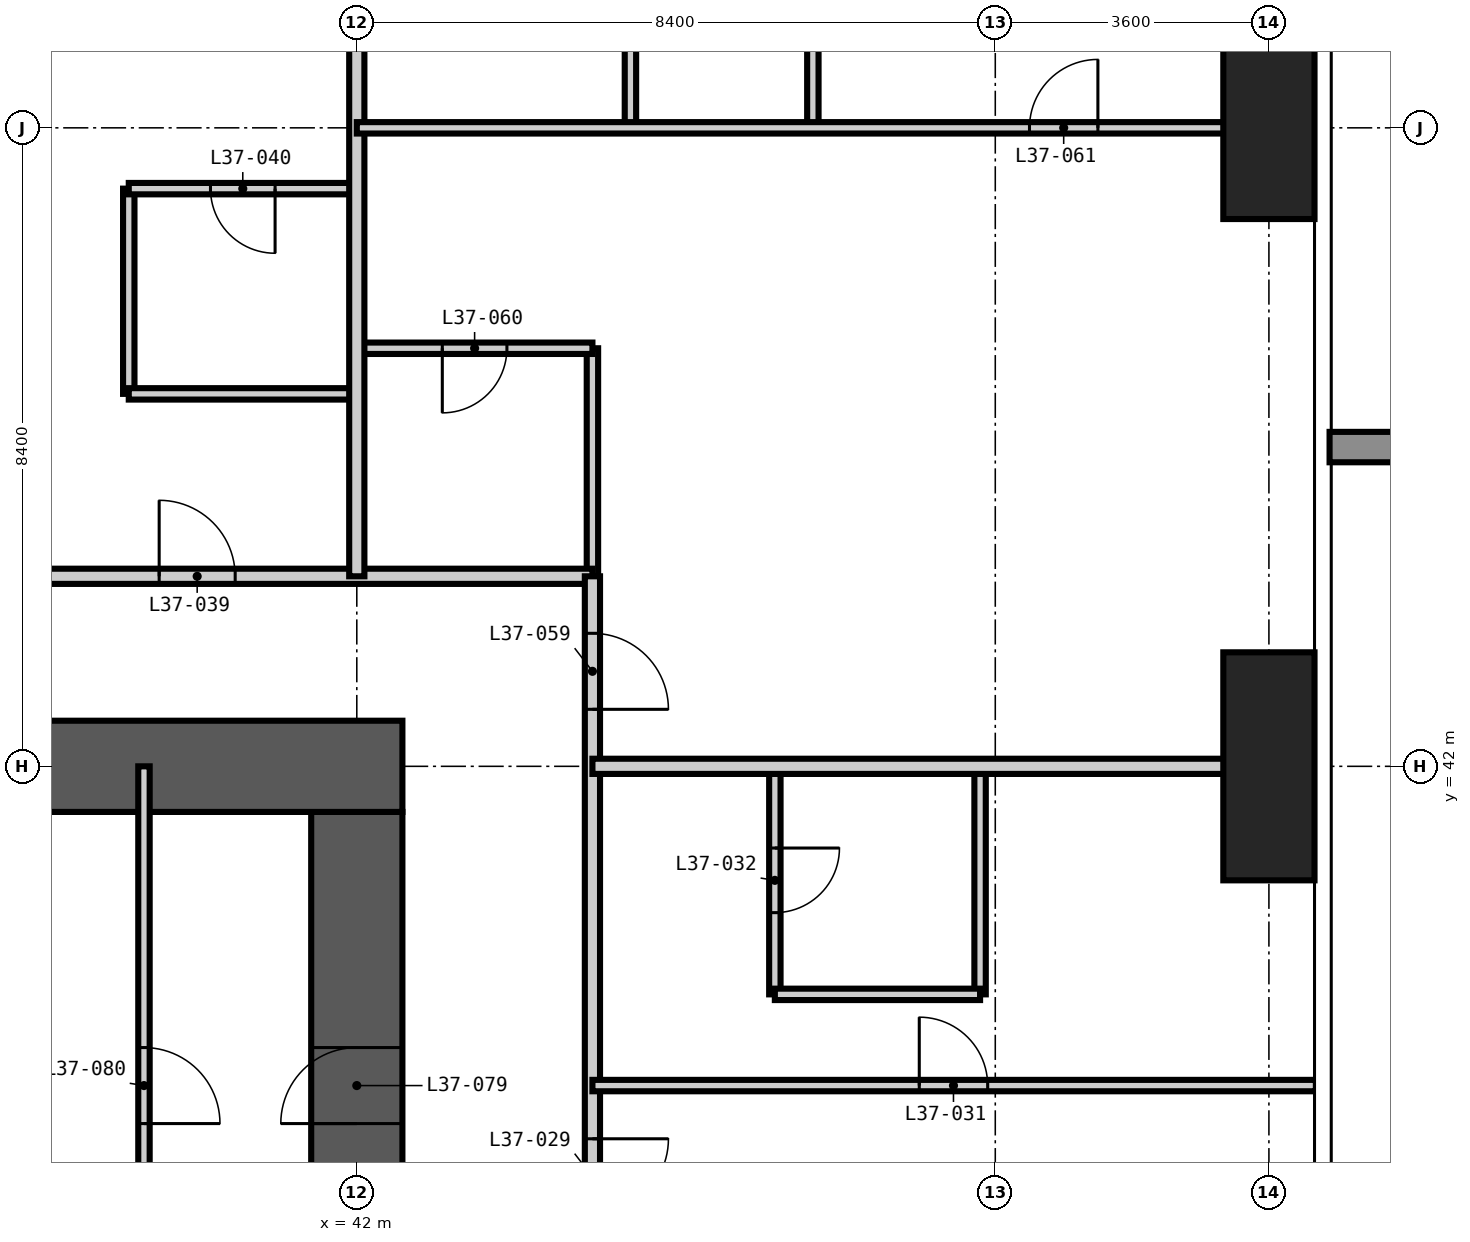
"""IFC4 building model, lengths in metres.
Left out: names, types, materials, properties, quantities, classifications, styles, units other than length and angle.
Written with IfcOpenShell. Run it as: python <this file> out.ifc"""

import sys

from ifc_helpers import new_model, si_unit, direction, frame, frame_2d, origin, origin_2d, place, context, subcontext, project, spatial, rectangle, extrude, element, fill, save


model = new_model("IFC4")
c1 = context("Model", 3, precision=1e-05, world=origin(), true_north=direction((0.0, 1.0)))
c2 = subcontext(c1, "Body", "Model", "MODEL_VIEW")
j1 = project(units=[si_unit("LENGTHUNIT", "METRE"), si_unit("PLANEANGLEUNIT", "RADIAN")], contexts=[c1])
p1 = place(None, origin())
s1 = spatial("IfcSite", under=j1, at=p1, CompositionType="ELEMENT")
p2 = place(p1, origin())
s2 = spatial("IfcBuilding", under=s1, at=p2, CompositionType="ELEMENT")
p3 = place(p2, frame((0.0, 0.0, 144.0)))
s3 = spatial("IfcBuildingStorey", under=s2, at=p3, CompositionType="ELEMENT", Elevation=144.0)
p4 = place(p3, frame((54.0, 42.0, -0.35), z_axis=(0.0, 0.0, 1.0), x_axis=(1.0, 0.0, 0.0)))
e1 = element("IfcColumn", 1, at=p4, inside=s3, PredefinedType="COLUMN", context=c2, shape_type="SweptSolid", body=[
    extrude(rectangle(XDim=1.2, YDim=3.0, at=origin_2d()), origin(), (0.0, 0.0, 1.0), 3.6),
])
p5 = place(p3, frame((54.0, 50.4, -0.35), z_axis=(0.0, 0.0, 1.0), x_axis=(1.0, 0.0, 0.0)))
e2 = element("IfcColumn", 2, at=p5, inside=s3, PredefinedType="COLUMN", context=c2, shape_type="SweptSolid", body=[
    extrude(rectangle(XDim=1.2, YDim=2.4, at=origin_2d()), origin(), (0.0, 0.0, 1.0), 3.6),
])
p6 = place(p3, frame((42.0, 17.4, -0.35), z_axis=(0.0, 0.0, 1.0), x_axis=(0.0, 1.0, 0.0)))
e3 = element("IfcWall", 3, at=p6, inside=s3, PredefinedType="SHEAR", context=c2, shape_type="SweptSolid", body=[
    extrude(rectangle(XDim=24.0, YDim=1.2, at=frame_2d((12.0, 0.0))), origin(), (0.0, 0.0, 1.0), 3.6),
])
p7 = place(p6, frame((0.2, 0.0, 0.35)))
e4 = element("IfcOpeningElement", 4, at=p7, cuts=e3, PredefinedType="OPENING", context=c2, shape_type="SweptSolid", body=[
    extrude(rectangle(XDim=1.2, YDim=2.2, at=frame_2d((0.6, 1.1))), frame((0.0, 0.61, 0.0), z_axis=(0.0, -1.0, 0.0), x_axis=(1.0, 0.0, 0.0)), (0.0, 0.0, 1.0), 1.22),
])
p8 = place(p6, frame((11.1, 0.0, 0.35)))
e5 = element("IfcOpeningElement", 5, at=p8, cuts=e3, PredefinedType="OPENING", context=c2, shape_type="SweptSolid", body=[
    extrude(rectangle(XDim=1.8, YDim=2.2, at=frame_2d((0.9, 1.1))), frame((0.0, 0.61, 0.0), z_axis=(0.0, -1.0, 0.0), x_axis=(1.0, 0.0, 0.0)), (0.0, 0.0, 1.0), 1.22),
])
p9 = place(p6, frame((19.9, 0.0, 0.35)))
e6 = element("IfcOpeningElement", 6, at=p9, cuts=e3, PredefinedType="OPENING", context=c2, shape_type="SweptSolid", body=[
    extrude(rectangle(XDim=1.0, YDim=2.1, at=frame_2d((0.5, 1.05))), frame((0.0, 0.61, 0.0), z_axis=(0.0, -1.0, 0.0), x_axis=(1.0, 0.0, 0.0)), (0.0, 0.0, 1.0), 1.22),
])
p10 = place(p3, frame((42.6, 42.0, -0.35), z_axis=(0.0, 0.0, 1.0), x_axis=(-1.0, 0.0, 0.0)))
e7 = element("IfcWall", 7, at=p10, inside=s3, PredefinedType="SHEAR", context=c2, shape_type="SweptSolid", body=[
    extrude(rectangle(XDim=26.4, YDim=1.2, at=frame_2d((13.2, 0.0))), origin(), (0.0, 0.0, 1.0), 3.6),
])
p11 = place(p10, frame((21.1, 0.0, 0.35)))
e8 = element("IfcOpeningElement", 8, at=p11, cuts=e7, PredefinedType="OPENING", context=c2, shape_type="SweptSolid", body=[
    extrude(rectangle(XDim=1.0, YDim=2.1, at=frame_2d((0.5, 1.05))), frame((0.0, 0.61, 0.0), z_axis=(0.0, -1.0, 0.0), x_axis=(1.0, 0.0, 0.0)), (0.0, 0.0, 1.0), 1.22),
])
p12 = place(p10, frame((10.5, 0.0, 0.35)))
e9 = element("IfcOpeningElement", 9, at=p12, cuts=e7, PredefinedType="OPENING", context=c2, shape_type="SweptSolid", body=[
    extrude(rectangle(XDim=1.2, YDim=2.2, at=frame_2d((0.6, 1.1))), frame((0.0, 0.61, 0.0), z_axis=(0.0, -1.0, 0.0), x_axis=(1.0, 0.0, 0.0)), (0.0, 0.0, 1.0), 1.22),
])
p13 = place(p3, frame((39.0, 46.9, 0.0), z_axis=(0.0, 0.0, 1.0), x_axis=(0.0, 1.0, 0.0)))
e10 = element("IfcWall", 10, at=p13, inside=s3, PredefinedType="PARTITIONING", context=c2, shape_type="SweptSolid", body=[
    extrude(rectangle(XDim=2.7, YDim=0.15, at=frame_2d((1.35, 0.0))), origin(), (0.0, 0.0, 1.0), 3.25),
])
p14 = place(p3, frame((45.1, 44.5, 0.0), z_axis=(0.0, 0.0, 1.0), x_axis=(0.0, 1.0, 0.0)))
e11 = element("IfcWall", 11, at=p14, inside=s3, PredefinedType="PARTITIONING", context=c2, shape_type="SweptSolid", body=[
    extrude(rectangle(XDim=3.0, YDim=0.15, at=frame_2d((1.5, 0.0))), origin(), (0.0, 0.0, 1.0), 3.25),
])
p15 = place(p3, frame((47.5, 39.0, 0.0), z_axis=(0.0, 0.0, 1.0), x_axis=(0.0, 1.0, 0.0)))
e12 = element("IfcWall", 12, at=p15, inside=s3, PredefinedType="PARTITIONING", context=c2, shape_type="SweptSolid", body=[
    extrude(rectangle(XDim=3.0, YDim=0.15, at=frame_2d((1.5, 0.0))), origin(), (0.0, 0.0, 1.0), 3.25),
])
p16 = place(p15, frame((1.075, 0.0, 0.0)))
e13 = element("IfcOpeningElement", 13, at=p16, cuts=e12, PredefinedType="OPENING", context=c2, shape_type="SweptSolid", body=[
    extrude(rectangle(XDim=0.85, YDim=2.1, at=frame_2d((0.425, 1.05))), frame((0.0, 0.085, 0.0), z_axis=(0.0, -1.0, 0.0), x_axis=(1.0, 0.0, 0.0)), (0.0, 0.0, 1.0), 0.17),
])
p17 = place(p3, frame((50.2, 39.0, 0.0), z_axis=(0.0, 0.0, 1.0), x_axis=(0.0, 1.0, 0.0)))
e14 = element("IfcWall", 14, at=p17, inside=s3, PredefinedType="PARTITIONING", context=c2, shape_type="SweptSolid", body=[
    extrude(rectangle(XDim=3.0, YDim=0.15, at=frame_2d((1.5, 0.0))), origin(), (0.0, 0.0, 1.0), 3.25),
])
p18 = place(p3, frame((47.5, 39.0, 0.0), z_axis=(0.0, 0.0, 1.0), x_axis=(1.0, 0.0, 0.0)))
e15 = element("IfcWall", 15, at=p18, inside=s3, PredefinedType="PARTITIONING", context=c2, shape_type="SweptSolid", body=[
    extrude(rectangle(XDim=2.7, YDim=0.15, at=frame_2d((1.35, 0.0))), origin(), (0.0, 0.0, 1.0), 3.25),
])
p19 = place(p3, frame((39.0, 46.9, 0.0), z_axis=(0.0, 0.0, 1.0), x_axis=(1.0, 0.0, 0.0)))
e16 = element("IfcWall", 16, at=p19, inside=s3, PredefinedType="PARTITIONING", context=c2, shape_type="SweptSolid", body=[
    extrude(rectangle(XDim=3.0, YDim=0.15, at=frame_2d((1.5, 0.0))), origin(), (0.0, 0.0, 1.0), 3.25),
])
p20 = place(p3, frame((42.0, 47.5, 0.0), z_axis=(0.0, 0.0, 1.0), x_axis=(1.0, 0.0, 0.0)))
e17 = element("IfcWall", 17, at=p20, inside=s3, PredefinedType="PARTITIONING", context=c2, shape_type="SweptSolid", body=[
    extrude(rectangle(XDim=3.1, YDim=0.15, at=frame_2d((1.55, 0.0))), origin(), (0.0, 0.0, 1.0), 3.25),
])
p21 = place(p20, frame((1.125, 0.0, 0.0)))
e18 = element("IfcOpeningElement", 18, at=p21, cuts=e17, PredefinedType="OPENING", context=c2, shape_type="SweptSolid", body=[
    extrude(rectangle(XDim=0.85, YDim=2.1, at=frame_2d((0.425, 1.05))), frame((0.0, 0.085, 0.0), z_axis=(0.0, -1.0, 0.0), x_axis=(1.0, 0.0, 0.0)), (0.0, 0.0, 1.0), 0.17),
])
p22 = place(p3, frame((39.0, 49.6, 0.0), z_axis=(0.0, 0.0, 1.0), x_axis=(1.0, 0.0, 0.0)))
e19 = element("IfcWall", 19, at=p22, inside=s3, PredefinedType="PARTITIONING", context=c2, shape_type="SweptSolid", body=[
    extrude(rectangle(XDim=3.0, YDim=0.15, at=frame_2d((1.5, 0.0))), origin(), (0.0, 0.0, 1.0), 3.25),
])
p23 = place(p22, frame((1.075, 0.0, 0.0)))
e20 = element("IfcOpeningElement", 20, at=p23, cuts=e19, PredefinedType="OPENING", context=c2, shape_type="SweptSolid", body=[
    extrude(rectangle(XDim=0.85, YDim=2.1, at=frame_2d((0.425, 1.05))), frame((0.0, 0.085, 0.0), z_axis=(0.0, -1.0, 0.0), x_axis=(1.0, 0.0, 0.0)), (0.0, 0.0, 1.0), 0.17),
])
p24 = place(p3, frame((12.6, 44.5, 0.0), z_axis=(0.0, 0.0, 1.0), x_axis=(1.0, 0.0, 0.0)))
e21 = element("IfcWall", 21, at=p24, inside=s3, PredefinedType="PARTITIONING", context=c2, shape_type="SweptSolid", body=[
    extrude(rectangle(XDim=32.5, YDim=0.2, at=frame_2d((16.25, 0.0))), origin(), (0.0, 0.0, 1.0), 3.25),
])
p25 = place(p24, frame((5.8, 0.0, 0.0)))
e22 = element("IfcOpeningElement", 22, at=p25, cuts=e21, PredefinedType="OPENING", context=c2, shape_type="SweptSolid", body=[
    extrude(rectangle(XDim=1.0, YDim=2.2, at=frame_2d((0.5, 1.1))), frame((0.0, 0.11, 0.0), z_axis=(0.0, -1.0, 0.0), x_axis=(1.0, 0.0, 0.0)), (0.0, 0.0, 1.0), 0.22),
])
p26 = place(p24, frame((12.1, 0.0, 0.0)))
e23 = element("IfcOpeningElement", 23, at=p26, cuts=e21, PredefinedType="OPENING", context=c2, shape_type="SweptSolid", body=[
    extrude(rectangle(XDim=1.0, YDim=2.2, at=frame_2d((0.5, 1.1))), frame((0.0, 0.11, 0.0), z_axis=(0.0, -1.0, 0.0), x_axis=(1.0, 0.0, 0.0)), (0.0, 0.0, 1.0), 0.22),
])
p27 = place(p24, frame((20.5, 0.0, 0.0)))
e24 = element("IfcOpeningElement", 24, at=p27, cuts=e21, PredefinedType="OPENING", context=c2, shape_type="SweptSolid", body=[
    extrude(rectangle(XDim=1.0, YDim=2.2, at=frame_2d((0.5, 1.1))), frame((0.0, 0.11, 0.0), z_axis=(0.0, -1.0, 0.0), x_axis=(1.0, 0.0, 0.0)), (0.0, 0.0, 1.0), 0.22),
])
p28 = place(p24, frame((26.8, 0.0, 0.0)))
e25 = element("IfcOpeningElement", 25, at=p28, cuts=e21, PredefinedType="OPENING", context=c2, shape_type="SweptSolid", body=[
    extrude(rectangle(XDim=1.0, YDim=2.2, at=frame_2d((0.5, 1.1))), frame((0.0, 0.11, 0.0), z_axis=(0.0, -1.0, 0.0), x_axis=(1.0, 0.0, 0.0)), (0.0, 0.0, 1.0), 0.22),
])
p29 = place(p3, frame((45.1, 44.5, 0.0), z_axis=(0.0, 0.0, 1.0), x_axis=(0.0, -1.0, 0.0)))
e26 = element("IfcWall", 26, at=p29, inside=s3, PredefinedType="PARTITIONING", context=c2, shape_type="SweptSolid", body=[
    extrude(rectangle(XDim=31.4, YDim=0.2, at=frame_2d((15.7, 0.0))), origin(), (0.0, 0.0, 1.0), 3.25),
])
p30 = place(p29, frame((24.2, 0.0, 0.0)))
e27 = element("IfcOpeningElement", 27, at=p30, cuts=e26, PredefinedType="OPENING", context=c2, shape_type="SweptSolid", body=[
    extrude(rectangle(XDim=1.0, YDim=2.2, at=frame_2d((0.5, 1.1))), frame((0.0, 0.11, 0.0), z_axis=(0.0, -1.0, 0.0), x_axis=(1.0, 0.0, 0.0)), (0.0, 0.0, 1.0), 0.22),
])
p31 = place(p29, frame((13.4, 0.0, 0.0)))
e28 = element("IfcOpeningElement", 28, at=p31, cuts=e26, PredefinedType="OPENING", context=c2, shape_type="SweptSolid", body=[
    extrude(rectangle(XDim=1.0, YDim=2.2, at=frame_2d((0.5, 1.1))), frame((0.0, 0.11, 0.0), z_axis=(0.0, -1.0, 0.0), x_axis=(1.0, 0.0, 0.0)), (0.0, 0.0, 1.0), 0.22),
])
p32 = place(p29, frame((7.4, 0.0, 0.0)))
e29 = element("IfcOpeningElement", 29, at=p32, cuts=e26, PredefinedType="OPENING", context=c2, shape_type="SweptSolid", body=[
    extrude(rectangle(XDim=1.0, YDim=2.2, at=frame_2d((0.5, 1.1))), frame((0.0, 0.11, 0.0), z_axis=(0.0, -1.0, 0.0), x_axis=(1.0, 0.0, 0.0)), (0.0, 0.0, 1.0), 0.22),
])
p33 = place(p29, frame((29.05, 0.0, 0.0)))
e30 = element("IfcOpeningElement", 30, at=p33, cuts=e26, PredefinedType="OPENING", context=c2, shape_type="SweptSolid", body=[
    extrude(rectangle(XDim=1.0, YDim=2.2, at=frame_2d((0.5, 1.1))), frame((0.0, 0.11, 0.0), z_axis=(0.0, -1.0, 0.0), x_axis=(1.0, 0.0, 0.0)), (0.0, 0.0, 1.0), 0.22),
])
p34 = place(p29, frame((0.75, 0.0, 0.0)))
e31 = element("IfcOpeningElement", 31, at=p34, cuts=e26, PredefinedType="OPENING", context=c2, shape_type="SweptSolid", body=[
    extrude(rectangle(XDim=1.0, YDim=2.2, at=frame_2d((0.5, 1.1))), frame((0.0, 0.11, 0.0), z_axis=(0.0, -1.0, 0.0), x_axis=(1.0, 0.0, 0.0)), (0.0, 0.0, 1.0), 0.22),
])
p35 = place(p3, frame((42.0, 44.5, 0.0), z_axis=(0.0, 0.0, 1.0), x_axis=(0.0, 1.0, 0.0)))
e32 = element("IfcWall", 32, at=p35, inside=s3, PredefinedType="PARTITIONING", context=c2, shape_type="SweptSolid", body=[
    extrude(rectangle(XDim=10.118, YDim=0.2, at=frame_2d((5.059, 0.0))), origin(), (0.0, 0.0, 1.0), 3.25),
])
p36 = place(p3, frame((45.1, 42.0, 0.0), z_axis=(0.0, 0.0, 1.0), x_axis=(1.0, 0.0, 0.0)))
e33 = element("IfcWall", 33, at=p36, inside=s3, PredefinedType="PARTITIONING", context=c2, shape_type="SweptSolid", body=[
    extrude(rectangle(XDim=9.518, YDim=0.2, at=frame_2d((4.759, 0.0))), origin(), (0.0, 0.0, 1.0), 3.25),
])
p37 = place(p3, frame((39.2, 33.6, 0.0), z_axis=(0.0, 0.0, 1.0), x_axis=(0.0, 1.0, 0.0)))
e34 = element("IfcWall", 34, at=p37, inside=s3, PredefinedType="PARTITIONING", context=c2, shape_type="SweptSolid", body=[
    extrude(rectangle(XDim=8.4, YDim=0.15, at=frame_2d((4.2, 0.0))), origin(), (0.0, 0.0, 1.0), 3.25),
])
p38 = place(p37, frame((3.7, 0.0, 0.0)))
e35 = element("IfcOpeningElement", 35, at=p38, cuts=e34, PredefinedType="OPENING", context=c2, shape_type="SweptSolid", body=[
    extrude(rectangle(XDim=1.0, YDim=2.1, at=frame_2d((0.5, 1.05))), frame((0.0, 0.085, 0.0), z_axis=(0.0, -1.0, 0.0), x_axis=(1.0, 0.0, 0.0)), (0.0, 0.0, 1.0), 0.17),
])
p39 = place(p3, frame((45.6, 50.4, 0.0), z_axis=(0.0, 0.0, 1.0), x_axis=(0.0, 1.0, 0.0)))
e36 = element("IfcWall", 36, at=p39, inside=s3, PredefinedType="PARTITIONING", context=c2, shape_type="SweptSolid", body=[
    extrude(rectangle(XDim=3.0, YDim=0.15, at=frame_2d((1.5, 0.0))), origin(), (0.0, 0.0, 1.0), 3.25),
])
p40 = place(p3, frame((48.0, 50.4, 0.0), z_axis=(0.0, 0.0, 1.0), x_axis=(0.0, 1.0, 0.0)))
e37 = element("IfcWall", 37, at=p40, inside=s3, PredefinedType="PARTITIONING", context=c2, shape_type="SweptSolid", body=[
    extrude(rectangle(XDim=3.0, YDim=0.15, at=frame_2d((1.5, 0.0))), origin(), (0.0, 0.0, 1.0), 3.25),
])
p41 = place(p40, frame((1.05, 0.0, 0.0)))
e38 = element("IfcOpeningElement", 38, at=p41, cuts=e37, PredefinedType="OPENING", context=c2, shape_type="SweptSolid", body=[
    extrude(rectangle(XDim=0.9, YDim=2.1, at=frame_2d((0.45, 1.05))), frame((0.0, 0.085, 0.0), z_axis=(0.0, -1.0, 0.0), x_axis=(1.0, 0.0, 0.0)), (0.0, 0.0, 1.0), 0.17),
])
p42 = place(p3, frame((45.1, 37.8, 0.0), z_axis=(0.0, 0.0, 1.0), x_axis=(1.0, 0.0, 0.0)))
e39 = element("IfcWall", 39, at=p42, inside=s3, PredefinedType="PARTITIONING", context=c2, shape_type="SweptSolid", body=[
    extrude(rectangle(XDim=9.518, YDim=0.15, at=frame_2d((4.759, 0.0))), origin(), (0.0, 0.0, 1.0), 3.25),
])
p43 = place(p42, frame((4.3, 0.0, 0.0)))
e40 = element("IfcOpeningElement", 40, at=p43, cuts=e39, PredefinedType="OPENING", context=c2, shape_type="SweptSolid", body=[
    extrude(rectangle(XDim=0.9, YDim=2.1, at=frame_2d((0.45, 1.05))), frame((0.0, 0.085, 0.0), z_axis=(0.0, -1.0, 0.0), x_axis=(1.0, 0.0, 0.0)), (0.0, 0.0, 1.0), 0.17),
])
p44 = place(p3, frame((42.0, 50.4, 0.0), z_axis=(0.0, 0.0, 1.0), x_axis=(1.0, 0.0, 0.0)))
e41 = element("IfcWall", 41, at=p44, inside=s3, PredefinedType="PARTITIONING", context=c2, shape_type="SweptSolid", body=[
    extrude(rectangle(XDim=12.618, YDim=0.15, at=frame_2d((6.309, 0.0))), origin(), (0.0, 0.0, 1.0), 3.25),
])
p45 = place(p44, frame((8.85, 0.0, 0.0)))
e42 = element("IfcOpeningElement", 42, at=p45, cuts=e41, PredefinedType="OPENING", context=c2, shape_type="SweptSolid", body=[
    extrude(rectangle(XDim=0.9, YDim=2.1, at=frame_2d((0.45, 1.05))), frame((0.0, 0.085, 0.0), z_axis=(0.0, -1.0, 0.0), x_axis=(1.0, 0.0, 0.0)), (0.0, 0.0, 1.0), 0.17),
])
p46 = place(p32, origin())
e43 = element("IfcDoor", 43, at=p46, inside=s3, OperationType="SINGLE_SWING_LEFT", PredefinedType="DOOR", context=c2, shape_type="SweptSolid", body=[
    extrude(rectangle(XDim=1.0, YDim=2.2, at=frame_2d((0.5, 1.1))), frame((0.0, 0.025, 0.0), z_axis=(0.0, -1.0, 0.0), x_axis=(1.0, 0.0, 0.0)), (0.0, 0.0, 1.0), 0.05),
])
fill(e29, e43)
p47 = place(p43, origin())
e44 = element("IfcDoor", 44, at=p47, inside=s3, OperationType="SINGLE_SWING_LEFT", PredefinedType="DOOR", context=c2, shape_type="SweptSolid", body=[
    extrude(rectangle(XDim=0.9, YDim=2.1, at=frame_2d((0.45, 1.05))), frame((0.0, 0.025, 0.0), z_axis=(0.0, -1.0, 0.0), x_axis=(1.0, 0.0, 0.0)), (0.0, 0.0, 1.0), 0.05),
])
fill(e40, e44)
p48 = place(p16, frame((0.85, 0.0, 0.0), z_axis=(0.0, 0.0, 1.0), x_axis=(-1.0, 0.0, 0.0)))
e45 = element("IfcDoor", 45, at=p48, inside=s3, OperationType="SINGLE_SWING_LEFT", PredefinedType="DOOR", context=c2, shape_type="SweptSolid", body=[
    extrude(rectangle(XDim=0.85, YDim=2.1, at=frame_2d((0.425, 1.05))), frame((0.0, 0.025, 0.0), z_axis=(0.0, -1.0, 0.0), x_axis=(1.0, 0.0, 0.0)), (0.0, 0.0, 1.0), 0.05),
])
fill(e13, e45)
p49 = place(p28, origin())
e46 = element("IfcDoor", 46, at=p49, inside=s3, OperationType="SINGLE_SWING_LEFT", PredefinedType="DOOR", context=c2, shape_type="SweptSolid", body=[
    extrude(rectangle(XDim=1.0, YDim=2.2, at=frame_2d((0.5, 1.1))), frame((0.0, 0.025, 0.0), z_axis=(0.0, -1.0, 0.0), x_axis=(1.0, 0.0, 0.0)), (0.0, 0.0, 1.0), 0.05),
])
fill(e25, e46)
p50 = place(p23, frame((0.85, 0.0, 0.0), z_axis=(0.0, 0.0, 1.0), x_axis=(-1.0, 0.0, 0.0)))
e47 = element("IfcDoor", 47, at=p50, inside=s3, OperationType="SINGLE_SWING_LEFT", PredefinedType="DOOR", context=c2, shape_type="SweptSolid", body=[
    extrude(rectangle(XDim=0.85, YDim=2.1, at=frame_2d((0.425, 1.05))), frame((0.0, 0.025, 0.0), z_axis=(0.0, -1.0, 0.0), x_axis=(1.0, 0.0, 0.0)), (0.0, 0.0, 1.0), 0.05),
])
fill(e20, e47)
p51 = place(p34, origin())
e48 = element("IfcDoor", 48, at=p51, inside=s3, OperationType="SINGLE_SWING_RIGHT", PredefinedType="DOOR", context=c2, shape_type="SweptSolid", body=[
    extrude(rectangle(XDim=1.0, YDim=2.2, at=frame_2d((0.5, 1.1))), frame((0.0, 0.025, 0.0), z_axis=(0.0, -1.0, 0.0), x_axis=(1.0, 0.0, 0.0)), (0.0, 0.0, 1.0), 0.05),
])
fill(e31, e48)
p52 = place(p21, frame((0.85, 0.0, 0.0), z_axis=(0.0, 0.0, 1.0), x_axis=(-1.0, 0.0, 0.0)))
e49 = element("IfcDoor", 49, at=p52, inside=s3, OperationType="SINGLE_SWING_RIGHT", PredefinedType="DOOR", context=c2, shape_type="SweptSolid", body=[
    extrude(rectangle(XDim=0.85, YDim=2.1, at=frame_2d((0.425, 1.05))), frame((0.0, 0.025, 0.0), z_axis=(0.0, -1.0, 0.0), x_axis=(1.0, 0.0, 0.0)), (0.0, 0.0, 1.0), 0.05),
])
fill(e18, e49)
p53 = place(p45, origin())
e50 = element("IfcDoor", 50, at=p53, inside=s3, OperationType="SINGLE_SWING_RIGHT", PredefinedType="DOOR", context=c2, shape_type="SweptSolid", body=[
    extrude(rectangle(XDim=0.9, YDim=2.1, at=frame_2d((0.45, 1.05))), frame((0.0, 0.025, 0.0), z_axis=(0.0, -1.0, 0.0), x_axis=(1.0, 0.0, 0.0)), (0.0, 0.0, 1.0), 0.05),
])
fill(e42, e50)
p54 = place(p9, origin())
e51 = element("IfcDoor", 51, at=p54, inside=s3, OperationType="SINGLE_SWING_LEFT", PredefinedType="DOOR", context=c2, shape_type="SweptSolid", body=[
    extrude(rectangle(XDim=1.0, YDim=2.1, at=frame_2d((0.5, 1.05))), frame((0.0, 0.025, 0.0), z_axis=(0.0, -1.0, 0.0), x_axis=(1.0, 0.0, 0.0)), (0.0, 0.0, 1.0), 0.05),
])
fill(e6, e51)
p55 = place(p38, frame((1.0, 0.0, 0.0), z_axis=(0.0, 0.0, 1.0), x_axis=(-1.0, 0.0, 0.0)))
e52 = element("IfcDoor", 52, at=p55, inside=s3, OperationType="SINGLE_SWING_RIGHT", PredefinedType="DOOR", context=c2, shape_type="SweptSolid", body=[
    extrude(rectangle(XDim=1.0, YDim=2.1, at=frame_2d((0.5, 1.05))), frame((0.0, 0.025, 0.0), z_axis=(0.0, -1.0, 0.0), x_axis=(1.0, 0.0, 0.0)), (0.0, 0.0, 1.0), 0.05),
])
fill(e35, e52)
save(model, sys.argv[1])
